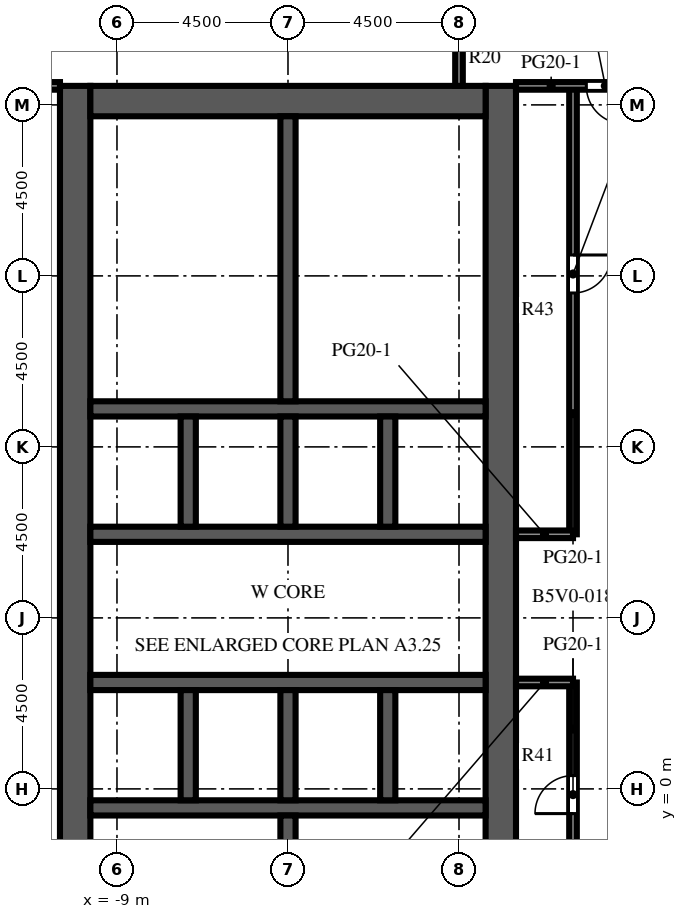
"""IFC4 building model, lengths in metres.
Left out: names, types, materials, properties, quantities, classifications, styles, units other than length and angle.
Written with IfcOpenShell. Run it as: python <this file> out.ifc"""

import sys

from ifc_helpers import new_model, si_unit, direction, frame, frame_2d, origin, place, context, subcontext, project, spatial, rectangle, extrude, element, fill, save


model = new_model("IFC4")
c1 = context("Model", 3, precision=1e-05, world=origin(), true_north=direction((0.0, 1.0)))
c2 = subcontext(c1, "Body", "Model", "MODEL_VIEW")
j1 = project(units=[si_unit("LENGTHUNIT", "METRE"), si_unit("PLANEANGLEUNIT", "RADIAN")], contexts=[c1])
p1 = place(None, origin())
s1 = spatial("IfcSite", under=j1, at=p1, CompositionType="ELEMENT")
p2 = place(p1, origin())
s2 = spatial("IfcBuilding", under=s1, at=p2, CompositionType="ELEMENT")
p3 = place(p2, frame((0.0, 0.0, 160.9)))
s3 = spatial("IfcBuildingStorey", under=s2, at=p3, CompositionType="ELEMENT", Elevation=160.9)
p4 = place(p3, frame((-10.1, -9.0, 0.0), z_axis=(0.0, 0.0, 1.0), x_axis=(0.0, 1.0, 0.0)))
e1 = element("IfcWall", 1, at=p4, inside=s3, PredefinedType="SHEAR", context=c2, shape_type="SweptSolid", body=[
    extrude(rectangle(XDim=27.5, YDim=0.8, at=frame_2d((13.75, 0.0))), origin(), (0.0, 0.0, 1.0), 4.1),
])
p5 = place(p4, frame((12.55, 0.0, 0.0)))
e2 = element("IfcOpeningElement", 2, at=p5, cuts=e1, PredefinedType="OPENING", context=c2, shape_type="SweptSolid", body=[
    extrude(rectangle(XDim=2.4, YDim=2.4, at=frame_2d((1.2, 1.2))), frame((0.0, 0.41, 0.0), z_axis=(0.0, -1.0, 0.0), x_axis=(1.0, 0.0, 0.0)), (0.0, 0.0, 1.0), 0.82),
])
p6 = place(p4, frame((6.825, 0.0, 0.0)))
e3 = element("IfcOpeningElement", 3, at=p6, cuts=e1, PredefinedType="OPENING", context=c2, shape_type="SweptSolid", body=[
    extrude(rectangle(XDim=1.2, YDim=2.1, at=frame_2d((0.6, 1.05))), frame((0.0, 0.41, 0.0), z_axis=(0.0, -1.0, 0.0), x_axis=(1.0, 0.0, 0.0)), (0.0, 0.0, 1.0), 0.82),
])
p7 = place(p4, frame((19.475, 0.0, 0.0)))
e4 = element("IfcOpeningElement", 4, at=p7, cuts=e1, PredefinedType="OPENING", context=c2, shape_type="SweptSolid", body=[
    extrude(rectangle(XDim=1.2, YDim=2.1, at=frame_2d((0.6, 1.05))), frame((0.0, 0.41, 0.0), z_axis=(0.0, -1.0, 0.0), x_axis=(1.0, 0.0, 0.0)), (0.0, 0.0, 1.0), 0.82),
])
p8 = place(p3, frame((1.1, -9.0, 0.0), z_axis=(0.0, 0.0, 1.0), x_axis=(0.0, 1.0, 0.0)))
e5 = element("IfcWall", 5, at=p8, inside=s3, PredefinedType="SHEAR", context=c2, shape_type="SweptSolid", body=[
    extrude(rectangle(XDim=27.5, YDim=0.8, at=frame_2d((13.75, 0.0))), origin(), (0.0, 0.0, 1.0), 4.1),
])
p9 = place(p8, frame((12.55, 0.0, 0.0)))
e6 = element("IfcOpeningElement", 6, at=p9, cuts=e5, PredefinedType="OPENING", context=c2, shape_type="SweptSolid", body=[
    extrude(rectangle(XDim=2.4, YDim=2.4, at=frame_2d((1.2, 1.2))), frame((0.0, 0.41, 0.0), z_axis=(0.0, -1.0, 0.0), x_axis=(1.0, 0.0, 0.0)), (0.0, 0.0, 1.0), 0.82),
])
p10 = place(p8, frame((5.45, 0.0, 0.0)))
e7 = element("IfcOpeningElement", 7, at=p10, cuts=e5, PredefinedType="OPENING", context=c2, shape_type="SweptSolid", body=[
    extrude(rectangle(XDim=1.2, YDim=2.1, at=frame_2d((0.6, 1.05))), frame((0.0, 0.41, 0.0), z_axis=(0.0, -1.0, 0.0), x_axis=(1.0, 0.0, 0.0)), (0.0, 0.0, 1.0), 0.82),
])
p11 = place(p8, frame((19.45, 0.0, 0.0)))
e8 = element("IfcOpeningElement", 8, at=p11, cuts=e5, PredefinedType="OPENING", context=c2, shape_type="SweptSolid", body=[
    extrude(rectangle(XDim=1.0, YDim=2.1, at=frame_2d((0.5, 1.05))), frame((0.0, 0.41, 0.0), z_axis=(0.0, -1.0, 0.0), x_axis=(1.0, 0.0, 0.0)), (0.0, 0.0, 1.0), 0.82),
])
p12 = place(p8, frame((21.137, 0.0, 0.0)))
e9 = element("IfcOpeningElement", 9, at=p12, cuts=e5, PredefinedType="OPENING", context=c2, shape_type="SweptSolid", body=[
    extrude(rectangle(XDim=1.0, YDim=2.1, at=frame_2d((0.5, 1.05))), frame((0.0, 0.41, 0.0), z_axis=(0.0, -1.0, 0.0), x_axis=(1.0, 0.0, 0.0)), (0.0, 0.0, 1.0), 0.82),
])
p13 = place(p8, frame((23.2, 0.0, 0.0)))
e10 = element("IfcOpeningElement", 10, at=p13, cuts=e5, PredefinedType="OPENING", context=c2, shape_type="SweptSolid", body=[
    extrude(rectangle(XDim=1.0, YDim=2.1, at=frame_2d((0.5, 1.05))), frame((0.0, 0.41, 0.0), z_axis=(0.0, -1.0, 0.0), x_axis=(1.0, 0.0, 0.0)), (0.0, 0.0, 1.0), 0.82),
])
p14 = place(p8, frame((25.262, 0.0, 0.0)))
e11 = element("IfcOpeningElement", 11, at=p14, cuts=e5, PredefinedType="OPENING", context=c2, shape_type="SweptSolid", body=[
    extrude(rectangle(XDim=1.0, YDim=2.1, at=frame_2d((0.5, 1.05))), frame((0.0, 0.41, 0.0), z_axis=(0.0, -1.0, 0.0), x_axis=(1.0, 0.0, 0.0)), (0.0, 0.0, 1.0), 0.82),
])
p15 = place(p3, frame((-9.7, 18.1, 0.0), z_axis=(0.0, 0.0, 1.0), x_axis=(1.0, 0.0, 0.0)))
e12 = element("IfcWall", 12, at=p15, inside=s3, PredefinedType="SHEAR", context=c2, shape_type="SweptSolid", body=[
    extrude(rectangle(XDim=10.4, YDim=0.8, at=frame_2d((5.2, 0.0))), origin(), (0.0, 0.0, 1.0), 4.1),
])
p16 = place(p3, frame((-9.7, -0.5, 0.0), z_axis=(0.0, 0.0, 1.0), x_axis=(1.0, 0.0, 0.0)))
e13 = element("IfcWall", 13, at=p16, inside=s3, PredefinedType="SHEAR", context=c2, shape_type="SweptSolid", body=[
    extrude(rectangle(XDim=10.4, YDim=0.4, at=frame_2d((5.2, 0.0))), origin(), (0.0, 0.0, 1.0), 4.1),
])
p17 = place(p3, frame((-9.7, 2.8, 0.0), z_axis=(0.0, 0.0, 1.0), x_axis=(1.0, 0.0, 0.0)))
e14 = element("IfcWall", 14, at=p17, inside=s3, PredefinedType="SHEAR", context=c2, shape_type="SweptSolid", body=[
    extrude(rectangle(XDim=10.4, YDim=0.4, at=frame_2d((5.2, 0.0))), origin(), (0.0, 0.0, 1.0), 4.1),
])
p18 = place(p17, frame((0.738, 0.0, 0.0)))
e15 = element("IfcOpeningElement", 15, at=p18, cuts=e14, PredefinedType="OPENING", context=c2, shape_type="SweptSolid", body=[
    extrude(rectangle(XDim=1.1, YDim=2.1, at=frame_2d((0.55, 1.05))), frame((0.0, 0.21, 0.0), z_axis=(0.0, -1.0, 0.0), x_axis=(1.0, 0.0, 0.0)), (0.0, 0.0, 1.0), 0.42),
])
p19 = place(p17, frame((3.337, 0.0, 0.0)))
e16 = element("IfcOpeningElement", 16, at=p19, cuts=e14, PredefinedType="OPENING", context=c2, shape_type="SweptSolid", body=[
    extrude(rectangle(XDim=1.1, YDim=2.1, at=frame_2d((0.55, 1.05))), frame((0.0, 0.21, 0.0), z_axis=(0.0, -1.0, 0.0), x_axis=(1.0, 0.0, 0.0)), (0.0, 0.0, 1.0), 0.42),
])
p20 = place(p17, frame((6.012, 0.0, 0.0)))
e17 = element("IfcOpeningElement", 17, at=p20, cuts=e14, PredefinedType="OPENING", context=c2, shape_type="SweptSolid", body=[
    extrude(rectangle(XDim=1.0, YDim=2.1, at=frame_2d((0.5, 1.05))), frame((0.0, 0.21, 0.0), z_axis=(0.0, -1.0, 0.0), x_axis=(1.0, 0.0, 0.0)), (0.0, 0.0, 1.0), 0.42),
])
p21 = place(p17, frame((8.613, 0.0, 0.0)))
e18 = element("IfcOpeningElement", 18, at=p21, cuts=e14, PredefinedType="OPENING", context=c2, shape_type="SweptSolid", body=[
    extrude(rectangle(XDim=1.0, YDim=2.1, at=frame_2d((0.5, 1.05))), frame((0.0, 0.21, 0.0), z_axis=(0.0, -1.0, 0.0), x_axis=(1.0, 0.0, 0.0)), (0.0, 0.0, 1.0), 0.42),
])
p22 = place(p3, frame((-9.7, 6.7, 0.0), z_axis=(0.0, 0.0, 1.0), x_axis=(1.0, 0.0, 0.0)))
e19 = element("IfcWall", 19, at=p22, inside=s3, PredefinedType="SHEAR", context=c2, shape_type="SweptSolid", body=[
    extrude(rectangle(XDim=10.4, YDim=0.4, at=frame_2d((5.2, 0.0))), origin(), (0.0, 0.0, 1.0), 4.1),
])
p23 = place(p22, frame((3.337, 0.0, 0.0)))
e20 = element("IfcOpeningElement", 20, at=p23, cuts=e19, PredefinedType="OPENING", context=c2, shape_type="SweptSolid", body=[
    extrude(rectangle(XDim=1.1, YDim=2.1, at=frame_2d((0.55, 1.05))), frame((0.0, 0.21, 0.0), z_axis=(0.0, -1.0, 0.0), x_axis=(1.0, 0.0, 0.0)), (0.0, 0.0, 1.0), 0.42),
])
p24 = place(p22, frame((5.962, 0.0, 0.0)))
e21 = element("IfcOpeningElement", 21, at=p24, cuts=e19, PredefinedType="OPENING", context=c2, shape_type="SweptSolid", body=[
    extrude(rectangle(XDim=1.1, YDim=2.1, at=frame_2d((0.55, 1.05))), frame((0.0, 0.21, 0.0), z_axis=(0.0, -1.0, 0.0), x_axis=(1.0, 0.0, 0.0)), (0.0, 0.0, 1.0), 0.42),
])
p25 = place(p22, frame((8.663, 0.0, 0.0)))
e22 = element("IfcOpeningElement", 22, at=p25, cuts=e19, PredefinedType="OPENING", context=c2, shape_type="SweptSolid", body=[
    extrude(rectangle(XDim=1.1, YDim=2.1, at=frame_2d((0.55, 1.05))), frame((0.0, 0.21, 0.0), z_axis=(0.0, -1.0, 0.0), x_axis=(1.0, 0.0, 0.0)), (0.0, 0.0, 1.0), 0.42),
])
p26 = place(p22, frame((0.688, 0.0, 0.0)))
e23 = element("IfcOpeningElement", 23, at=p26, cuts=e19, PredefinedType="OPENING", context=c2, shape_type="SweptSolid", body=[
    extrude(rectangle(XDim=1.0, YDim=2.1, at=frame_2d((0.5, 1.05))), frame((0.0, 0.21, 0.0), z_axis=(0.0, -1.0, 0.0), x_axis=(1.0, 0.0, 0.0)), (0.0, 0.0, 1.0), 0.42),
])
p27 = place(p3, frame((-9.7, 10.0, 0.0), z_axis=(0.0, 0.0, 1.0), x_axis=(1.0, 0.0, 0.0)))
e24 = element("IfcWall", 24, at=p27, inside=s3, PredefinedType="SHEAR", context=c2, shape_type="SweptSolid", body=[
    extrude(rectangle(XDim=10.4, YDim=0.4, at=frame_2d((5.2, 0.0))), origin(), (0.0, 0.0, 1.0), 4.1),
])
for number, where, z_axis, x_axis in (
    (25, (-7.125, -0.3, 0.0), (0.0, 0.0, 1.0), (0.0, 1.0, 0.0)),
    (26, (-7.125, 6.9, 0.0), (0.0, 0.0, 1.0), (0.0, 1.0, 0.0)),
    (27, (-4.5, -0.3, 0.0), (0.0, 0.0, 1.0), (0.0, 1.0, 0.0)),
    (28, (-4.5, 6.9, 0.0), (0.0, 0.0, 1.0), (0.0, 1.0, 0.0)),
    (29, (-1.875, -0.3, 0.0), (0.0, 0.0, 1.0), (0.0, 1.0, 0.0)),
    (30, (-1.875, 6.9, 0.0), (0.0, 0.0, 1.0), (0.0, 1.0, 0.0)),
):
    element("IfcWall", number, at=place(p3, frame(where, z_axis=z_axis, x_axis=x_axis)), inside=s3, PredefinedType="SHEAR", context=c2, shape_type="SweptSolid", body=[
        extrude(rectangle(XDim=2.9, YDim=0.4, at=frame_2d((1.45, 0.0))), origin(), (0.0, 0.0, 1.0), 4.1),
    ])
for number, where, z_axis, x_axis in (
    (31, (-4.5, -8.2, 0.0), (0.0, 0.0, 1.0), (0.0, 1.0, 0.0)),
    (32, (-4.5, 10.2, 0.0), (0.0, 0.0, 1.0), (0.0, 1.0, 0.0)),
):
    element("IfcWall", number, at=place(p3, frame(where, z_axis=z_axis, x_axis=x_axis)), inside=s3, PredefinedType="SHEAR", context=c2, shape_type="SweptSolid", body=[
        extrude(rectangle(XDim=7.5, YDim=0.4, at=frame_2d((3.75, 0.0))), origin(), (0.0, 0.0, 1.0), 4.1),
    ])
p28 = place(p3, frame((-0.8, -2.95, 0.0), z_axis=(0.0, 0.0, 1.0), x_axis=(0.0, 1.0, 0.0)))
e33 = element("IfcWall", 33, at=p28, inside=s3, PredefinedType="PARTITIONING", context=c2, shape_type="SweptSolid", body=[
    extrude(rectangle(XDim=2.25, YDim=0.1, at=frame_2d((1.125, 0.0))), origin(), (0.0, 0.0, 1.0), 3.65),
])
p29 = place(p28, frame((0.625, 0.0, 0.0)))
e34 = element("IfcOpeningElement", 34, at=p29, cuts=e33, PredefinedType="OPENING", context=c2, shape_type="SweptSolid", body=[
    extrude(rectangle(XDim=1.0, YDim=2.1, at=frame_2d((0.5, 1.05))), frame((0.0, 0.06, 0.0), z_axis=(0.0, -1.0, 0.0), x_axis=(1.0, 0.0, 0.0)), (0.0, 0.0, 1.0), 0.12),
])
for number, where, z_axis, x_axis in (
    (35, (-4.3, 11.7, 0.0), (0.0, 0.0, 1.0), (1.0, 0.0, 0.0)),
    (36, (-4.3, 13.575, 0.0), (0.0, 0.0, 1.0), (1.0, 0.0, 0.0)),
    (37, (-4.3, 15.825, 0.0), (0.0, 0.0, 1.0), (1.0, 0.0, 0.0)),
):
    element("IfcWall", number, at=place(p3, frame(where, z_axis=z_axis, x_axis=x_axis)), inside=s3, PredefinedType="PARTITIONING", context=c2, shape_type="SweptSolid", body=[
        extrude(rectangle(XDim=5.0, YDim=0.1, at=frame_2d((2.5, 0.0))), origin(), (0.0, 0.0, 1.0), 3.65),
    ])
p30 = place(p3, frame((0.0, 18.5, 0.0), z_axis=(0.0, 0.0, 1.0), x_axis=(0.0, 1.0, 0.0)))
e38 = element("IfcWall", 38, at=p30, inside=s3, PredefinedType="PARTITIONING", context=c2, shape_type="SweptSolid", body=[
    extrude(rectangle(XDim=3.4, YDim=0.2, at=frame_2d((1.7, 0.0))), origin(), (0.0, 0.0, 1.0), 3.65),
])
p31 = place(p3, frame((3.0, -2.0, 0.0), z_axis=(0.0, 0.0, 1.0), x_axis=(0.0, 1.0, 0.0)))
e39 = element("IfcWall", 39, at=p31, inside=s3, PredefinedType="PARTITIONING", context=c2, shape_type="SweptSolid", body=[
    extrude(rectangle(XDim=4.8, YDim=0.2, at=frame_2d((2.4, 0.0))), origin(), (0.0, 0.0, 1.0), 3.65),
])
p32 = place(p31, frame((1.35, 0.0, 0.0)))
e40 = element("IfcOpeningElement", 40, at=p32, cuts=e39, PredefinedType="OPENING", context=c2, shape_type="SweptSolid", body=[
    extrude(rectangle(XDim=1.0, YDim=2.1, at=frame_2d((0.5, 1.05))), frame((0.0, 0.11, 0.0), z_axis=(0.0, -1.0, 0.0), x_axis=(1.0, 0.0, 0.0)), (0.0, 0.0, 1.0), 0.22),
])
p33 = place(p3, frame((3.0, 6.7, 0.0), z_axis=(0.0, 0.0, 1.0), x_axis=(0.0, 1.0, 0.0)))
e41 = element("IfcWall", 41, at=p33, inside=s3, PredefinedType="PARTITIONING", context=c2, shape_type="SweptSolid", body=[
    extrude(rectangle(XDim=11.8, YDim=0.2, at=frame_2d((5.9, 0.0))), origin(), (0.0, 0.0, 1.0), 3.65),
])
p34 = place(p33, frame((6.35, 0.0, 0.0)))
e42 = element("IfcOpeningElement", 42, at=p34, cuts=e41, PredefinedType="OPENING", context=c2, shape_type="SweptSolid", body=[
    extrude(rectangle(XDim=1.0, YDim=2.1, at=frame_2d((0.5, 1.05))), frame((0.0, 0.11, 0.0), z_axis=(0.0, -1.0, 0.0), x_axis=(1.0, 0.0, 0.0)), (0.0, 0.0, 1.0), 0.22),
])
for number, where, z_axis, x_axis in (
    (43, (1.5, 2.8, 0.0), (0.0, 0.0, 1.0), (1.0, 0.0, 0.0)),
    (44, (1.5, 6.7, 0.0), (0.0, 0.0, 1.0), (1.0, 0.0, 0.0)),
):
    element("IfcWall", number, at=place(p3, frame(where, z_axis=z_axis, x_axis=x_axis)), inside=s3, PredefinedType="PARTITIONING", context=c2, shape_type="SweptSolid", body=[
        extrude(rectangle(XDim=1.5, YDim=0.2, at=frame_2d((0.75, 0.0))), origin(), (0.0, 0.0, 1.0), 3.65),
    ])
p35 = place(p3, frame((-13.5, 18.5, 0.0), z_axis=(0.0, 0.0, 1.0), x_axis=(1.0, 0.0, 0.0)))
e45 = element("IfcWall", 45, at=p35, inside=s3, PredefinedType="PARTITIONING", context=c2, shape_type="SweptSolid", body=[
    extrude(rectangle(XDim=3.0, YDim=0.2, at=frame_2d((1.5, 0.0))), origin(), (0.0, 0.0, 1.0), 3.65),
])
p36 = place(p35, frame((1.35, 0.0, 0.0)))
e46 = element("IfcOpeningElement", 46, at=p36, cuts=e45, PredefinedType="OPENING", context=c2, shape_type="SweptSolid", body=[
    extrude(rectangle(XDim=1.0, YDim=2.1, at=frame_2d((0.5, 1.05))), frame((0.0, 0.11, 0.0), z_axis=(0.0, -1.0, 0.0), x_axis=(1.0, 0.0, 0.0)), (0.0, 0.0, 1.0), 0.22),
])
p37 = place(p3, frame((1.5, 18.5, 0.0), z_axis=(0.0, 0.0, 1.0), x_axis=(1.0, 0.0, 0.0)))
e47 = element("IfcWall", 47, at=p37, inside=s3, PredefinedType="PARTITIONING", context=c2, shape_type="SweptSolid", body=[
    extrude(rectangle(XDim=4.5, YDim=0.2, at=frame_2d((2.25, 0.0))), origin(), (0.0, 0.0, 1.0), 3.65),
])
p38 = place(p37, frame((1.85, 0.0, 0.0)))
e48 = element("IfcOpeningElement", 48, at=p38, cuts=e47, PredefinedType="OPENING", context=c2, shape_type="SweptSolid", body=[
    extrude(rectangle(XDim=1.0, YDim=2.1, at=frame_2d((0.5, 1.05))), frame((0.0, 0.11, 0.0), z_axis=(0.0, -1.0, 0.0), x_axis=(1.0, 0.0, 0.0)), (0.0, 0.0, 1.0), 0.22),
])
p39 = place(p18, origin())
e49 = element("IfcDoor", 49, at=p39, inside=s3, OperationType="DOUBLE_DOOR_SLIDING", PredefinedType="DOOR", context=c2, shape_type="SweptSolid", body=[
    extrude(rectangle(XDim=1.1, YDim=2.1, at=frame_2d((0.55, 1.05))), frame((0.0, 0.025, 0.0), z_axis=(0.0, -1.0, 0.0), x_axis=(1.0, 0.0, 0.0)), (0.0, 0.0, 1.0), 0.05),
])
fill(e15, e49)
p40 = place(p19, origin())
e50 = element("IfcDoor", 50, at=p40, inside=s3, OperationType="DOUBLE_DOOR_SLIDING", PredefinedType="DOOR", context=c2, shape_type="SweptSolid", body=[
    extrude(rectangle(XDim=1.1, YDim=2.1, at=frame_2d((0.55, 1.05))), frame((0.0, 0.025, 0.0), z_axis=(0.0, -1.0, 0.0), x_axis=(1.0, 0.0, 0.0)), (0.0, 0.0, 1.0), 0.05),
])
fill(e16, e50)
p41 = place(p23, origin())
e51 = element("IfcDoor", 51, at=p41, inside=s3, OperationType="DOUBLE_DOOR_SLIDING", PredefinedType="DOOR", context=c2, shape_type="SweptSolid", body=[
    extrude(rectangle(XDim=1.1, YDim=2.1, at=frame_2d((0.55, 1.05))), frame((0.0, 0.025, 0.0), z_axis=(0.0, -1.0, 0.0), x_axis=(1.0, 0.0, 0.0)), (0.0, 0.0, 1.0), 0.05),
])
fill(e20, e51)
p42 = place(p24, origin())
e52 = element("IfcDoor", 52, at=p42, inside=s3, OperationType="DOUBLE_DOOR_SLIDING", PredefinedType="DOOR", context=c2, shape_type="SweptSolid", body=[
    extrude(rectangle(XDim=1.1, YDim=2.1, at=frame_2d((0.55, 1.05))), frame((0.0, 0.025, 0.0), z_axis=(0.0, -1.0, 0.0), x_axis=(1.0, 0.0, 0.0)), (0.0, 0.0, 1.0), 0.05),
])
fill(e21, e52)
p43 = place(p25, origin())
e53 = element("IfcDoor", 53, at=p43, inside=s3, OperationType="DOUBLE_DOOR_SLIDING", PredefinedType="DOOR", context=c2, shape_type="SweptSolid", body=[
    extrude(rectangle(XDim=1.1, YDim=2.1, at=frame_2d((0.55, 1.05))), frame((0.0, 0.025, 0.0), z_axis=(0.0, -1.0, 0.0), x_axis=(1.0, 0.0, 0.0)), (0.0, 0.0, 1.0), 0.05),
])
fill(e22, e53)
p44 = place(p5, origin())
e54 = element("IfcDoor", 54, at=p44, inside=s3, OperationType="DOUBLE_DOOR_DOUBLE_SWING", PredefinedType="DOOR", context=c2, shape_type="SweptSolid", body=[
    extrude(rectangle(XDim=2.4, YDim=2.4, at=frame_2d((1.2, 1.2))), frame((0.0, 0.025, 0.0), z_axis=(0.0, -1.0, 0.0), x_axis=(1.0, 0.0, 0.0)), (0.0, 0.0, 1.0), 0.05),
])
fill(e2, e54)
p45 = place(p9, origin())
e55 = element("IfcDoor", 55, at=p45, inside=s3, OperationType="DOUBLE_DOOR_DOUBLE_SWING", PredefinedType="DOOR", context=c2, shape_type="SweptSolid", body=[
    extrude(rectangle(XDim=2.4, YDim=2.4, at=frame_2d((1.2, 1.2))), frame((0.0, 0.025, 0.0), z_axis=(0.0, -1.0, 0.0), x_axis=(1.0, 0.0, 0.0)), (0.0, 0.0, 1.0), 0.05),
])
fill(e6, e55)
p46 = place(p6, origin())
e56 = element("IfcDoor", 56, at=p46, inside=s3, OperationType="SINGLE_SWING_LEFT", PredefinedType="DOOR", context=c2, shape_type="SweptSolid", body=[
    extrude(rectangle(XDim=1.2, YDim=2.1, at=frame_2d((0.6, 1.05))), frame((0.0, 0.025, 0.0), z_axis=(0.0, -1.0, 0.0), x_axis=(1.0, 0.0, 0.0)), (0.0, 0.0, 1.0), 0.05),
])
fill(e3, e56)
p47 = place(p7, origin())
e57 = element("IfcDoor", 57, at=p47, inside=s3, OperationType="SINGLE_SWING_LEFT", PredefinedType="DOOR", context=c2, shape_type="SweptSolid", body=[
    extrude(rectangle(XDim=1.2, YDim=2.1, at=frame_2d((0.6, 1.05))), frame((0.0, 0.025, 0.0), z_axis=(0.0, -1.0, 0.0), x_axis=(1.0, 0.0, 0.0)), (0.0, 0.0, 1.0), 0.05),
])
fill(e4, e57)
p48 = place(p20, origin())
e58 = element("IfcDoor", 58, at=p48, inside=s3, OperationType="SINGLE_SWING_LEFT", PredefinedType="DOOR", context=c2, shape_type="SweptSolid", body=[
    extrude(rectangle(XDim=1.0, YDim=2.1, at=frame_2d((0.5, 1.05))), frame((0.0, 0.025, 0.0), z_axis=(0.0, -1.0, 0.0), x_axis=(1.0, 0.0, 0.0)), (0.0, 0.0, 1.0), 0.05),
])
fill(e17, e58)
p49 = place(p21, origin())
e59 = element("IfcDoor", 59, at=p49, inside=s3, OperationType="SINGLE_SWING_RIGHT", PredefinedType="DOOR", context=c2, shape_type="SweptSolid", body=[
    extrude(rectangle(XDim=1.0, YDim=2.1, at=frame_2d((0.5, 1.05))), frame((0.0, 0.025, 0.0), z_axis=(0.0, -1.0, 0.0), x_axis=(1.0, 0.0, 0.0)), (0.0, 0.0, 1.0), 0.05),
])
fill(e18, e59)
p50 = place(p26, origin())
e60 = element("IfcDoor", 60, at=p50, inside=s3, OperationType="SINGLE_SWING_LEFT", PredefinedType="DOOR", context=c2, shape_type="SweptSolid", body=[
    extrude(rectangle(XDim=1.0, YDim=2.1, at=frame_2d((0.5, 1.05))), frame((0.0, 0.025, 0.0), z_axis=(0.0, -1.0, 0.0), x_axis=(1.0, 0.0, 0.0)), (0.0, 0.0, 1.0), 0.05),
])
fill(e23, e60)
p51 = place(p11, origin())
e61 = element("IfcDoor", 61, at=p51, inside=s3, OperationType="SINGLE_SWING_LEFT", PredefinedType="DOOR", context=c2, shape_type="SweptSolid", body=[
    extrude(rectangle(XDim=1.0, YDim=2.1, at=frame_2d((0.5, 1.05))), frame((0.0, 0.375, 0.0), z_axis=(0.0, -1.0, 0.0), x_axis=(1.0, 0.0, 0.0)), (0.0, 0.0, 1.0), 0.05),
])
fill(e8, e61)
p52 = place(p12, origin())
e62 = element("IfcDoor", 62, at=p52, inside=s3, OperationType="SINGLE_SWING_RIGHT", PredefinedType="DOOR", context=c2, shape_type="SweptSolid", body=[
    extrude(rectangle(XDim=1.0, YDim=2.1, at=frame_2d((0.5, 1.05))), frame((0.0, 0.375, 0.0), z_axis=(0.0, -1.0, 0.0), x_axis=(1.0, 0.0, 0.0)), (0.0, 0.0, 1.0), 0.05),
])
fill(e9, e62)
p53 = place(p13, origin())
e63 = element("IfcDoor", 63, at=p53, inside=s3, OperationType="SINGLE_SWING_LEFT", PredefinedType="DOOR", context=c2, shape_type="SweptSolid", body=[
    extrude(rectangle(XDim=1.0, YDim=2.1, at=frame_2d((0.5, 1.05))), frame((0.0, 0.375, 0.0), z_axis=(0.0, -1.0, 0.0), x_axis=(1.0, 0.0, 0.0)), (0.0, 0.0, 1.0), 0.05),
])
fill(e10, e63)
p54 = place(p14, origin())
e64 = element("IfcDoor", 64, at=p54, inside=s3, OperationType="SINGLE_SWING_RIGHT", PredefinedType="DOOR", context=c2, shape_type="SweptSolid", body=[
    extrude(rectangle(XDim=1.0, YDim=2.1, at=frame_2d((0.5, 1.05))), frame((0.0, 0.375, 0.0), z_axis=(0.0, -1.0, 0.0), x_axis=(1.0, 0.0, 0.0)), (0.0, 0.0, 1.0), 0.05),
])
fill(e11, e64)
p55 = place(p32, origin())
e65 = element("IfcDoor", 65, at=p55, inside=s3, OperationType="SINGLE_SWING_LEFT", PredefinedType="DOOR", context=c2, shape_type="SweptSolid", body=[
    extrude(rectangle(XDim=1.0, YDim=2.1, at=frame_2d((0.5, 1.05))), frame((0.0, 0.025, 0.0), z_axis=(0.0, -1.0, 0.0), x_axis=(1.0, 0.0, 0.0)), (0.0, 0.0, 1.0), 0.05),
])
fill(e40, e65)
p56 = place(p34, origin())
e66 = element("IfcDoor", 66, at=p56, inside=s3, OperationType="SINGLE_SWING_RIGHT", PredefinedType="DOOR", context=c2, shape_type="SweptSolid", body=[
    extrude(rectangle(XDim=1.0, YDim=2.1, at=frame_2d((0.5, 1.05))), frame((0.0, 0.025, 0.0), z_axis=(0.0, -1.0, 0.0), x_axis=(1.0, 0.0, 0.0)), (0.0, 0.0, 1.0), 0.05),
])
fill(e42, e66)
p57 = place(p38, origin())
e67 = element("IfcDoor", 67, at=p57, inside=s3, OperationType="SINGLE_SWING_RIGHT", PredefinedType="DOOR", context=c2, shape_type="SweptSolid", body=[
    extrude(rectangle(XDim=1.0, YDim=2.1, at=frame_2d((0.5, 1.05))), frame((0.0, 0.025, 0.0), z_axis=(0.0, -1.0, 0.0), x_axis=(1.0, 0.0, 0.0)), (0.0, 0.0, 1.0), 0.05),
])
fill(e48, e67)
save(model, sys.argv[1])
